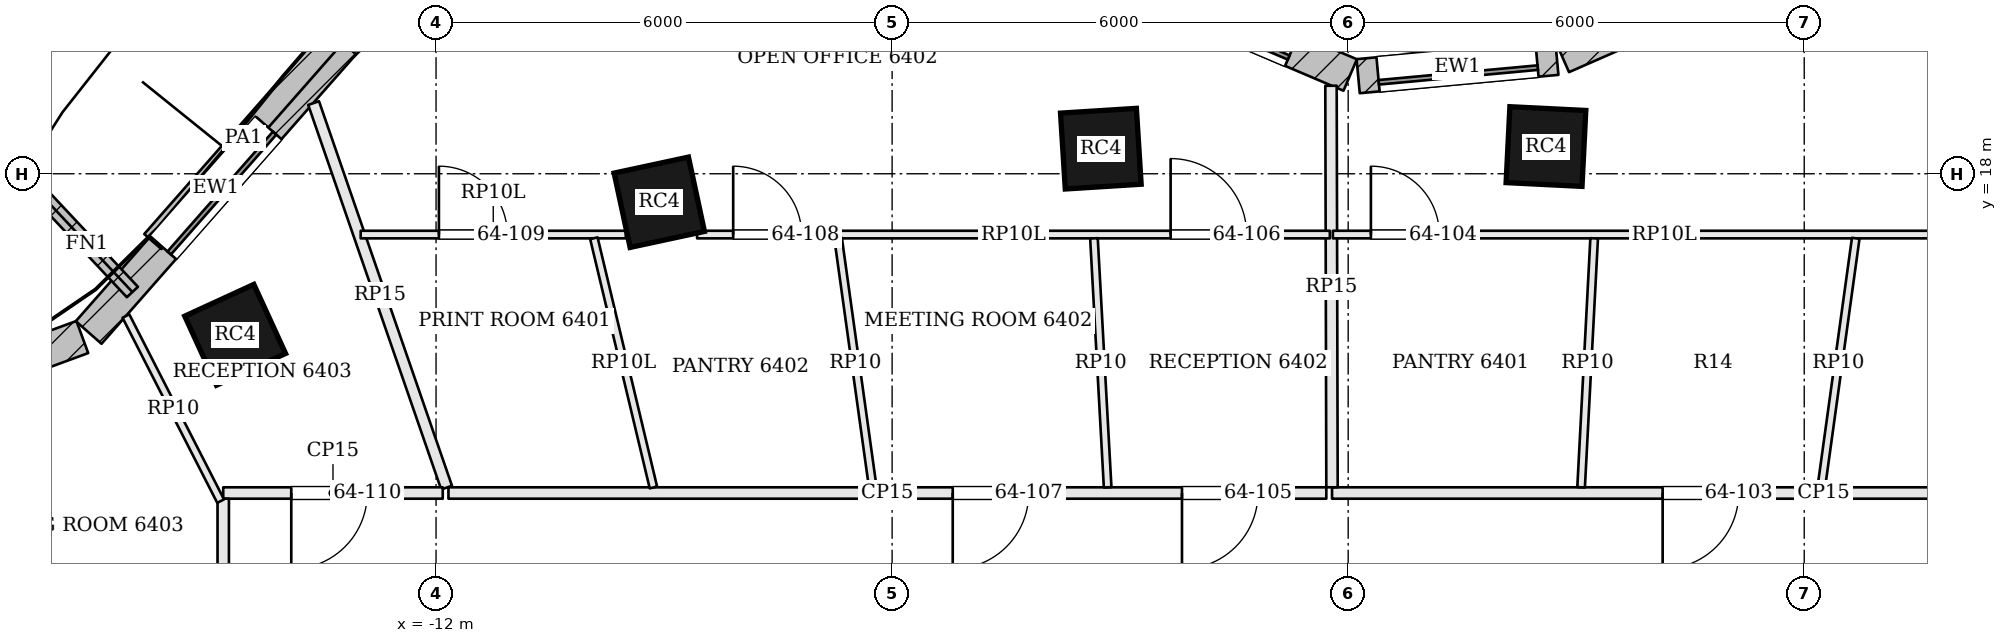
"""IFC4 building model, lengths in metres.
Left out: names, types, materials, properties, quantities, classifications, styles, units other than length and angle.
Written with IfcOpenShell. Run it as: python <this file> out.ifc"""

import sys

from ifc_helpers import new_model, si_unit, direction, frame, frame_2d, origin, origin_2d, place, context, subcontext, project, spatial, rectangle, extrude, element, fill, save


model = new_model("IFC4")
c1 = context("Model", 3, precision=1e-05, world=origin(), true_north=direction((0.0, 1.0)))
c2 = subcontext(c1, "Body", "Model", "MODEL_VIEW")
j1 = project(units=[si_unit("LENGTHUNIT", "METRE"), si_unit("PLANEANGLEUNIT", "RADIAN")], contexts=[c1])
p1 = place(None, origin())
s1 = spatial("IfcSite", under=j1, at=p1, CompositionType="ELEMENT")
p2 = place(p1, origin())
s2 = spatial("IfcBuilding", under=s1, at=p2, CompositionType="ELEMENT")
p3 = place(p2, frame((0.0, 0.0, 260.4)))
s3 = spatial("IfcBuildingStorey", under=s2, at=p3, CompositionType="ELEMENT", Elevation=260.4)
for number, where, z_axis, x_axis in (
    (1, (2.602, 18.358, 0.0), (0.0, 0.0, 1.0), (-0.999, 0.05, 0.0)),
    (2, (-3.254, 18.33, 0.0), (0.0, 0.0, 1.0), (-0.998, -0.063, 0.0)),
    (3, (-9.063, 17.625, 0.0), (0.0, 0.0, 1.0), (-0.978, -0.21, 0.0)),
    (4, (-14.643, 15.881, 0.0), (0.0, 0.0, 1.0), (-0.909, -0.417, 0.0)),
):
    element("IfcColumn", number, at=place(p3, frame(where, z_axis=z_axis, x_axis=x_axis)), inside=s3, PredefinedType="COLUMN", context=c2, shape_type="SweptSolid", body=[
        extrude(rectangle(XDim=1.0, YDim=1.0, at=origin_2d()), origin(), (0.0, 0.0, 1.0), 3.1),
    ])
p4 = place(p3, frame((7.276, 21.498, 0.0), z_axis=(0.0, 0.0, 1.0), x_axis=(-0.915872941312, -0.401468249519, 0.0)))
e5 = element("IfcWall", 5, at=p4, inside=s3, PredefinedType="SOLIDWALL", context=c2, shape_type="SweptSolid", body=[
    extrude(rectangle(XDim=4.87, YDim=0.45, at=frame_2d((2.435, 0.0))), origin(), (0.0, 0.0, 1.0), 3.6),
])
p5 = place(p4, frame((1.385, 0.0, 0.9)))
e6 = element("IfcOpeningElement", 6, at=p5, cuts=e5, PredefinedType="OPENING", context=c2, shape_type="SweptSolid", body=[
    extrude(rectangle(XDim=2.1, YDim=1.8, at=frame_2d((1.05, 0.9))), frame((0.0, 0.235, 0.0), z_axis=(0.0, -1.0, 0.0), x_axis=(1.0, 0.0, 0.0)), (0.0, 0.0, 1.0), 0.47),
])
p6 = place(p3, frame((2.745, 19.525, 0.0), z_axis=(0.0, 0.0, 1.0), x_axis=(-0.995768774275, -0.091894222771, 0.0)))
e7 = element("IfcWall", 7, at=p6, inside=s3, PredefinedType="SOLIDWALL", context=c2, shape_type="SweptSolid", body=[
    extrude(rectangle(XDim=2.625, YDim=0.45, at=frame_2d((1.312, 0.0))), origin(), (0.0, 0.0, 1.0), 3.6),
])
p7 = place(p6, frame((0.262, 0.0, 0.9)))
e8 = element("IfcOpeningElement", 8, at=p7, cuts=e7, PredefinedType="OPENING", context=c2, shape_type="SweptSolid", body=[
    extrude(rectangle(XDim=2.1, YDim=1.8, at=frame_2d((1.05, 0.9))), frame((0.0, 0.235, 0.0), z_axis=(0.0, -1.0, 0.0), x_axis=(1.0, 0.0, 0.0)), (0.0, 0.0, 1.0), 0.47),
])
p8 = place(p3, frame((0.026, 19.299, 0.0), z_axis=(0.0, 0.0, 1.0), x_axis=(-0.920040408927, 0.391823488245, 0.0)))
e9 = element("IfcWall", 9, at=p8, inside=s3, PredefinedType="SOLIDWALL", context=c2, shape_type="SweptSolid", body=[
    extrude(rectangle(XDim=3.77, YDim=0.45, at=frame_2d((1.885, 0.0))), origin(), (0.0, 0.0, 1.0), 3.6),
])
p9 = place(p8, frame((0.835, 0.0, 0.9)))
e10 = element("IfcOpeningElement", 10, at=p9, cuts=e9, PredefinedType="OPENING", context=c2, shape_type="SweptSolid", body=[
    extrude(rectangle(XDim=2.1, YDim=1.8, at=frame_2d((1.05, 0.9))), frame((0.0, 0.235, 0.0), z_axis=(0.0, -1.0, 0.0), x_axis=(1.0, 0.0, 0.0)), (0.0, 0.0, 1.0), 0.47),
])
p10 = place(p3, frame((-11.027, 21.779, 0.0), z_axis=(0.0, 0.0, 1.0), x_axis=(-0.728871214251, -0.684650825631, 0.0)))
e11 = element("IfcWall", 11, at=p10, inside=s3, PredefinedType="SOLIDWALL", context=c2, shape_type="SweptSolid", body=[
    extrude(rectangle(XDim=3.031, YDim=0.45, at=frame_2d((1.516, 0.0))), origin(), (0.0, 0.0, 1.0), 3.6),
])
p11 = place(p10, frame((0.466, 0.0, 0.9)))
e12 = element("IfcOpeningElement", 12, at=p11, cuts=e11, PredefinedType="OPENING", context=c2, shape_type="SweptSolid", body=[
    extrude(rectangle(XDim=2.1, YDim=1.8, at=frame_2d((1.05, 0.9))), frame((0.0, 0.235, 0.0), z_axis=(0.0, -1.0, 0.0), x_axis=(1.0, 0.0, 0.0)), (0.0, 0.0, 1.0), 0.47),
])
p12 = place(p3, frame((-13.221, 19.719, 0.0), z_axis=(0.0, 0.0, 1.0), x_axis=(-0.660424908916, -0.750892095899, 0.0)))
e13 = element("IfcWall", 13, at=p12, inside=s3, PredefinedType="SOLIDWALL", context=c2, shape_type="SweptSolid", body=[
    extrude(rectangle(XDim=5.071, YDim=0.45, at=frame_2d((2.535, 0.0))), origin(), (0.0, 0.0, 1.0), 3.6),
])
p13 = place(p12, frame((1.485, 0.0, 0.9)))
e14 = element("IfcOpeningElement", 14, at=p13, cuts=e13, PredefinedType="OPENING", context=c2, shape_type="SweptSolid", body=[
    extrude(rectangle(XDim=2.1, YDim=1.8, at=frame_2d((1.05, 0.9))), frame((0.0, 0.235, 0.0), z_axis=(0.0, -1.0, 0.0), x_axis=(1.0, 0.0, 0.0)), (0.0, 0.0, 1.0), 0.47),
])
p14 = place(p3, frame((-16.654, 15.852, 0.0), z_axis=(0.0, 0.0, 1.0), x_axis=(-0.938636568132, -0.344907803572, 0.0)))
e15 = element("IfcWall", 15, at=p14, inside=s3, PredefinedType="SOLIDWALL", context=c2, shape_type="SweptSolid", body=[
    extrude(rectangle(XDim=3.887, YDim=0.45, at=frame_2d((1.944, 0.0))), origin(), (0.0, 0.0, 1.0), 3.6),
])
p15 = place(p14, frame((0.894, 0.0, 0.9)))
e16 = element("IfcOpeningElement", 16, at=p15, cuts=e15, PredefinedType="OPENING", context=c2, shape_type="SweptSolid", body=[
    extrude(rectangle(XDim=2.1, YDim=1.8, at=frame_2d((1.05, 0.9))), frame((0.0, 0.235, 0.0), z_axis=(0.0, -1.0, 0.0), x_axis=(1.0, 0.0, 0.0)), (0.0, 0.0, 1.0), 0.47),
])
p16 = place(p3, frame((-15.995, 16.444, 0.0), z_axis=(0.0, 0.0, 1.0), x_axis=(-0.683852936488, 0.729619874494, 0.0)))
e17 = element("IfcWall", 17, at=p16, inside=s3, PredefinedType="SOLIDWALL", context=c2, shape_type="SweptSolid", body=[
    extrude(rectangle(XDim=1.75, YDim=0.2, at=frame_2d((0.875, 0.0))), origin(), (0.0, 0.0, 1.0), 3.6),
])
p17 = place(p3, frame((-13.339, 19.822, 3.9), z_axis=(0.0, 0.0, 1.0), x_axis=(-0.660443655688, -0.750875607316, 0.0)))
e18 = element("IfcWall", 18, at=p17, inside=s3, PredefinedType="PARAPET", context=c2, shape_type="SweptSolid", body=[
    extrude(rectangle(XDim=3.615, YDim=0.3, at=frame_2d((1.808, 0.0))), origin(), (0.0, 0.0, 1.0), 1.1),
])
p18 = place(p3, frame((12.119, 13.8, 0.0), z_axis=(0.0, 0.0, 1.0), x_axis=(-1.0, 0.0, 0.0)))
e19 = element("IfcWall", 19, at=p18, inside=s3, PredefinedType="PARTITIONING", context=c2, shape_type="SweptSolid", body=[
    extrude(rectangle(XDim=12.332, YDim=0.15, at=frame_2d((6.166, 0.0))), origin(), (0.0, 0.0, 1.0), 2.984),
])
p19 = place(p18, frame((2.053, 0.0, 0.0)))
e20 = element("IfcOpeningElement", 20, at=p19, cuts=e19, PredefinedType="OPENING", context=c2, shape_type="SweptSolid", body=[
    extrude(rectangle(XDim=1.8, YDim=2.1, at=frame_2d((0.9, 1.05))), frame((0.0, 0.085, 0.0), z_axis=(0.0, -1.0, 0.0), x_axis=(1.0, 0.0, 0.0)), (0.0, 0.0, 1.0), 0.17),
])
p20 = place(p18, frame((6.982, 0.0, 0.0)))
e21 = element("IfcOpeningElement", 21, at=p20, cuts=e19, PredefinedType="OPENING", context=c2, shape_type="SweptSolid", body=[
    extrude(rectangle(XDim=1.0, YDim=2.4, at=frame_2d((0.5, 1.2))), frame((0.0, 0.085, 0.0), z_axis=(0.0, -1.0, 0.0), x_axis=(1.0, 0.0, 0.0)), (0.0, 0.0, 1.0), 0.17),
])
p21 = place(p3, frame((-0.226, 19.158, 0.0), z_axis=(0.0, 0.0, 1.0), x_axis=(0.002541816357, -0.99999676958, 0.0)))
e22 = element("IfcWall", 22, at=p21, inside=s3, PredefinedType="PARTITIONING", context=c2, shape_type="SweptSolid", body=[
    extrude(rectangle(XDim=5.283, YDim=0.15, at=frame_2d((2.641, 0.0))), origin(), (0.0, 0.0, 1.0), 2.984),
])
p22 = place(p3, frame((-0.288, 13.8, 0.0), z_axis=(0.0, 0.0, 1.0), x_axis=(-1.0, 0.0, 0.0)))
e23 = element("IfcWall", 23, at=p22, inside=s3, PredefinedType="PARTITIONING", context=c2, shape_type="SweptSolid", body=[
    extrude(rectangle(XDim=11.549, YDim=0.15, at=frame_2d((5.775, 0.0))), origin(), (0.0, 0.0, 1.0), 2.984),
])
p23 = place(p22, frame((0.899, 0.0, 0.0)))
e24 = element("IfcOpeningElement", 24, at=p23, cuts=e23, PredefinedType="OPENING", context=c2, shape_type="SweptSolid", body=[
    extrude(rectangle(XDim=1.0, YDim=2.1, at=frame_2d((0.5, 1.05))), frame((0.0, 0.085, 0.0), z_axis=(0.0, -1.0, 0.0), x_axis=(1.0, 0.0, 0.0)), (0.0, 0.0, 1.0), 0.17),
])
p24 = place(p22, frame((3.915, 0.0, 0.0)))
e25 = element("IfcOpeningElement", 25, at=p24, cuts=e23, PredefinedType="OPENING", context=c2, shape_type="SweptSolid", body=[
    extrude(rectangle(XDim=1.0, YDim=2.4, at=frame_2d((0.5, 1.2))), frame((0.0, 0.085, 0.0), z_axis=(0.0, -1.0, 0.0), x_axis=(1.0, 0.0, 0.0)), (0.0, 0.0, 1.0), 0.17),
])
p25 = place(p3, frame((-13.611, 18.93, 0.0), z_axis=(0.0, 0.0, 1.0), x_axis=(0.326825455095, -0.945084716786, 0.0)))
e26 = element("IfcWall", 26, at=p25, inside=s3, PredefinedType="PARTITIONING", context=c2, shape_type="SweptSolid", body=[
    extrude(rectangle(XDim=5.353, YDim=0.15, at=frame_2d((2.677, 0.0))), origin(), (0.0, 0.0, 1.0), 2.984),
])
p26 = place(p3, frame((-11.912, 13.8, 0.0), z_axis=(0.0, 0.0, 1.0), x_axis=(-1.0, 0.0, 0.0)))
e27 = element("IfcWall", 27, at=p26, inside=s3, PredefinedType="PARTITIONING", context=c2, shape_type="SweptSolid", body=[
    extrude(rectangle(XDim=2.888, YDim=0.15, at=frame_2d((1.444, 0.0))), origin(), (0.0, 0.0, 1.0), 2.984),
])
p27 = place(p26, frame((0.993, 0.0, 0.0)))
e28 = element("IfcOpeningElement", 28, at=p27, cuts=e27, PredefinedType="OPENING", context=c2, shape_type="SweptSolid", body=[
    extrude(rectangle(XDim=1.0, YDim=2.1, at=frame_2d((0.5, 1.05))), frame((0.0, 0.085, 0.0), z_axis=(0.0, -1.0, 0.0), x_axis=(1.0, 0.0, 0.0)), (0.0, 0.0, 1.0), 0.17),
])
p28 = place(p3, frame((-14.8, 13.725, 0.0), z_axis=(0.0, 0.0, 1.0), x_axis=(0.0, -1.0, 0.0)))
e29 = element("IfcWall", 29, at=p28, inside=s3, PredefinedType="PARTITIONING", context=c2, shape_type="SweptSolid", body=[
    extrude(rectangle(XDim=10.059, YDim=0.15, at=frame_2d((5.03, 0.0))), origin(), (0.0, 0.0, 1.0), 2.984),
])
p29 = place(p28, frame((2.596, 0.0, 0.0)))
e30 = element("IfcOpeningElement", 30, at=p29, cuts=e29, PredefinedType="OPENING", context=c2, shape_type="SweptSolid", body=[
    extrude(rectangle(XDim=1.0, YDim=2.4, at=frame_2d((0.5, 1.2))), frame((0.0, 0.085, 0.0), z_axis=(0.0, -1.0, 0.0), x_axis=(1.0, 0.0, 0.0)), (0.0, 0.0, 1.0), 0.17),
])
p30 = place(p28, frame((7.45, 0.0, 0.0)))
e31 = element("IfcOpeningElement", 31, at=p30, cuts=e29, PredefinedType="OPENING", context=c2, shape_type="SweptSolid", body=[
    extrude(rectangle(XDim=1.0, YDim=2.1, at=frame_2d((0.5, 1.05))), frame((0.0, 0.085, 0.0), z_axis=(0.0, -1.0, 0.0), x_axis=(1.0, 0.0, 0.0)), (0.0, 0.0, 1.0), 0.17),
])
p31 = place(p3, frame((-0.201, 17.2, 0.0), z_axis=(0.0, 0.0, 1.0), x_axis=(1.0, 0.0, 0.0)))
e32 = element("IfcWall", 32, at=p31, inside=s3, PredefinedType="PARTITIONING", context=c2, shape_type="SweptSolid", body=[
    extrude(rectangle(XDim=8.722, YDim=0.1, at=frame_2d((4.361, 0.0))), origin(), (0.0, 0.0, 1.0), 2.58),
])
p32 = place(p31, frame((0.5, 0.0, 0.0)))
e33 = element("IfcOpeningElement", 33, at=p32, cuts=e32, PredefinedType="OPENING", context=c2, shape_type="SweptSolid", body=[
    extrude(rectangle(XDim=0.9, YDim=2.1, at=frame_2d((0.45, 1.05))), frame((0.0, 0.06, 0.0), z_axis=(0.0, -1.0, 0.0), x_axis=(1.0, 0.0, 0.0)), (0.0, 0.0, 1.0), 0.12),
])
p33 = place(p3, frame((6.224, 13.874, 0.0), z_axis=(0.0, 0.0, 1.0), x_axis=(0.13700708293, 0.990570067803, 0.0)))
e34 = element("IfcWall", 34, at=p33, inside=s3, PredefinedType="PARTITIONING", context=c2, shape_type="SweptSolid", body=[
    extrude(rectangle(XDim=3.307, YDim=0.1, at=frame_2d((1.654, 0.0))), origin(), (0.0, 0.0, 1.0), 2.984),
])
p34 = place(p3, frame((3.064, 13.875, 0.0), z_axis=(0.0, 0.0, 1.0), x_axis=(0.05240645469, 0.998625837592, 0.0)))
e35 = element("IfcWall", 35, at=p34, inside=s3, PredefinedType="PARTITIONING", context=c2, shape_type="SweptSolid", body=[
    extrude(rectangle(XDim=3.28, YDim=0.1, at=frame_2d((1.64, 0.0))), origin(), (0.0, 0.0, 1.0), 2.984),
])
p35 = place(p3, frame((-12.991, 17.2, 0.0), z_axis=(0.0, 0.0, 1.0), x_axis=(1.0, 0.0, 0.0)))
e36 = element("IfcWall", 36, at=p35, inside=s3, PredefinedType="PARTITIONING", context=c2, shape_type="SweptSolid", body=[
    extrude(rectangle(XDim=3.488, YDim=0.1, at=frame_2d((1.744, 0.0))), origin(), (0.0, 0.0, 1.0), 2.58),
])
p36 = place(p35, frame((1.029, 0.0, 0.0)))
e37 = element("IfcOpeningElement", 37, at=p36, cuts=e36, PredefinedType="OPENING", context=c2, shape_type="SweptSolid", body=[
    extrude(rectangle(XDim=0.9, YDim=2.1, at=frame_2d((0.45, 1.05))), frame((0.0, 0.06, 0.0), z_axis=(0.0, -1.0, 0.0), x_axis=(1.0, 0.0, 0.0)), (0.0, 0.0, 1.0), 0.12),
])
p37 = place(p3, frame((-8.566, 17.2, 0.0), z_axis=(0.0, 0.0, 1.0), x_axis=(1.0, 0.0, 0.0)))
e38 = element("IfcWall", 38, at=p37, inside=s3, PredefinedType="PARTITIONING", context=c2, shape_type="SweptSolid", body=[
    extrude(rectangle(XDim=8.325, YDim=0.1, at=frame_2d((4.162, 0.0))), origin(), (0.0, 0.0, 1.0), 2.58),
])
p38 = place(p37, frame((6.23, 0.0, 0.0)))
e39 = element("IfcOpeningElement", 39, at=p38, cuts=e38, PredefinedType="OPENING", context=c2, shape_type="SweptSolid", body=[
    extrude(rectangle(XDim=1.0, YDim=2.1, at=frame_2d((0.5, 1.05))), frame((0.0, 0.06, 0.0), z_axis=(0.0, -1.0, 0.0), x_axis=(1.0, 0.0, 0.0)), (0.0, 0.0, 1.0), 0.12),
])
p39 = place(p37, frame((0.475, 0.0, 0.0)))
e40 = element("IfcOpeningElement", 40, at=p39, cuts=e38, PredefinedType="OPENING", context=c2, shape_type="SweptSolid", body=[
    extrude(rectangle(XDim=0.9, YDim=2.1, at=frame_2d((0.45, 1.05))), frame((0.0, 0.06, 0.0), z_axis=(0.0, -1.0, 0.0), x_axis=(1.0, 0.0, 0.0)), (0.0, 0.0, 1.0), 0.12),
])
p40 = place(p3, frame((-3.165, 13.875, 0.0), z_axis=(0.0, 0.0, 1.0), x_axis=(-0.054855780122, 0.998494288109, 0.0)))
e41 = element("IfcWall", 41, at=p40, inside=s3, PredefinedType="PARTITIONING", context=c2, shape_type="SweptSolid", body=[
    extrude(rectangle(XDim=3.28, YDim=0.1, at=frame_2d((1.64, 0.0))), origin(), (0.0, 0.0, 1.0), 2.984),
])
p41 = place(p3, frame((-6.254, 13.874, 0.0), z_axis=(0.0, 0.0, 1.0), x_axis=(-0.137948523614, 0.990439399879, 0.0)))
e42 = element("IfcWall", 42, at=p41, inside=s3, PredefinedType="PARTITIONING", context=c2, shape_type="SweptSolid", body=[
    extrude(rectangle(XDim=3.308, YDim=0.1, at=frame_2d((1.654, 0.0))), origin(), (0.0, 0.0, 1.0), 2.984),
])
p42 = place(p3, frame((-9.14, 13.873, 0.0), z_axis=(0.0, 0.0, 1.0), x_axis=(-0.232348315027, 0.97263264417, 0.0)))
e43 = element("IfcWall", 43, at=p42, inside=s3, PredefinedType="PARTITIONING", context=c2, shape_type="SweptSolid", body=[
    extrude(rectangle(XDim=3.371, YDim=0.1, at=frame_2d((1.686, 0.0))), origin(), (0.0, 0.0, 1.0), 2.58),
])
p43 = place(p3, frame((-14.834, 13.693, 0.0), z_axis=(0.0, 0.0, 1.0), x_axis=(-0.455511992018, 0.89022964741, 0.0)))
e44 = element("IfcWall", 44, at=p43, inside=s3, PredefinedType="PARTITIONING", context=c2, shape_type="SweptSolid", body=[
    extrude(rectangle(XDim=2.736, YDim=0.1, at=frame_2d((1.368, 0.0))), origin(), (0.0, 0.0, 1.0), 2.984),
])
p44 = place(p7, origin())
e45 = element("IfcWindow", 45, at=p44, inside=s3, PartitioningType="SINGLE_PANEL", PredefinedType="WINDOW", context=c2, shape_type="SweptSolid", body=[
    extrude(rectangle(XDim=2.1, YDim=1.8, at=frame_2d((1.05, 0.9))), frame((0.0, 0.135, 0.0), z_axis=(0.0, -1.0, 0.0), x_axis=(1.0, 0.0, 0.0)), (0.0, 0.0, 1.0), 0.06),
])
fill(e8, e45)
p45 = place(p9, origin())
e46 = element("IfcWindow", 46, at=p45, inside=s3, PartitioningType="SINGLE_PANEL", PredefinedType="WINDOW", context=c2, shape_type="SweptSolid", body=[
    extrude(rectangle(XDim=2.1, YDim=1.8, at=frame_2d((1.05, 0.9))), frame((0.0, 0.135, 0.0), z_axis=(0.0, -1.0, 0.0), x_axis=(1.0, 0.0, 0.0)), (0.0, 0.0, 1.0), 0.06),
])
fill(e10, e46)
p46 = place(p13, origin())
e47 = element("IfcWindow", 47, at=p46, inside=s3, PartitioningType="SINGLE_PANEL", PredefinedType="WINDOW", context=c2, shape_type="SweptSolid", body=[
    extrude(rectangle(XDim=2.1, YDim=1.8, at=frame_2d((1.05, 0.9))), frame((0.0, 0.135, 0.0), z_axis=(0.0, -1.0, 0.0), x_axis=(1.0, 0.0, 0.0)), (0.0, 0.0, 1.0), 0.06),
])
fill(e14, e47)
p47 = place(p20, origin())
e48 = element("IfcDoor", 48, at=p47, inside=s3, OperationType="SINGLE_SWING_RIGHT", PredefinedType="DOOR", context=c2, shape_type="SweptSolid", body=[
    extrude(rectangle(XDim=1.0, YDim=2.4, at=frame_2d((0.5, 1.2))), frame((0.0, 0.025, 0.0), z_axis=(0.0, -1.0, 0.0), x_axis=(1.0, 0.0, 0.0)), (0.0, 0.0, 1.0), 0.05),
])
fill(e21, e48)
p48 = place(p32, origin())
e49 = element("IfcDoor", 49, at=p48, inside=s3, OperationType="SINGLE_SWING_LEFT", PredefinedType="DOOR", context=c2, shape_type="SweptSolid", body=[
    extrude(rectangle(XDim=0.9, YDim=2.1, at=frame_2d((0.45, 1.05))), frame((0.0, 0.025, 0.0), z_axis=(0.0, -1.0, 0.0), x_axis=(1.0, 0.0, 0.0)), (0.0, 0.0, 1.0), 0.05),
])
fill(e33, e49)
p49 = place(p23, origin())
e50 = element("IfcDoor", 50, at=p49, inside=s3, OperationType="SINGLE_SWING_RIGHT", PredefinedType="DOOR", context=c2, shape_type="SweptSolid", body=[
    extrude(rectangle(XDim=1.0, YDim=2.1, at=frame_2d((0.5, 1.05))), frame((0.0, 0.025, 0.0), z_axis=(0.0, -1.0, 0.0), x_axis=(1.0, 0.0, 0.0)), (0.0, 0.0, 1.0), 0.05),
])
fill(e24, e50)
p50 = place(p38, origin())
e51 = element("IfcDoor", 51, at=p50, inside=s3, OperationType="SINGLE_SWING_LEFT", PredefinedType="DOOR", context=c2, shape_type="SweptSolid", body=[
    extrude(rectangle(XDim=1.0, YDim=2.1, at=frame_2d((0.5, 1.05))), frame((0.0, 0.025, 0.0), z_axis=(0.0, -1.0, 0.0), x_axis=(1.0, 0.0, 0.0)), (0.0, 0.0, 1.0), 0.05),
])
fill(e39, e51)
p51 = place(p24, origin())
e52 = element("IfcDoor", 52, at=p51, inside=s3, OperationType="SINGLE_SWING_RIGHT", PredefinedType="DOOR", context=c2, shape_type="SweptSolid", body=[
    extrude(rectangle(XDim=1.0, YDim=2.4, at=frame_2d((0.5, 1.2))), frame((0.0, 0.025, 0.0), z_axis=(0.0, -1.0, 0.0), x_axis=(1.0, 0.0, 0.0)), (0.0, 0.0, 1.0), 0.05),
])
fill(e25, e52)
p52 = place(p39, origin())
e53 = element("IfcDoor", 53, at=p52, inside=s3, OperationType="SINGLE_SWING_LEFT", PredefinedType="DOOR", context=c2, shape_type="SweptSolid", body=[
    extrude(rectangle(XDim=0.9, YDim=2.1, at=frame_2d((0.45, 1.05))), frame((0.0, 0.025, 0.0), z_axis=(0.0, -1.0, 0.0), x_axis=(1.0, 0.0, 0.0)), (0.0, 0.0, 1.0), 0.05),
])
fill(e40, e53)
p53 = place(p36, origin())
e54 = element("IfcDoor", 54, at=p53, inside=s3, OperationType="SINGLE_SWING_LEFT", PredefinedType="DOOR", context=c2, shape_type="SweptSolid", body=[
    extrude(rectangle(XDim=0.9, YDim=2.1, at=frame_2d((0.45, 1.05))), frame((0.0, 0.025, 0.0), z_axis=(0.0, -1.0, 0.0), x_axis=(1.0, 0.0, 0.0)), (0.0, 0.0, 1.0), 0.05),
])
fill(e37, e54)
p54 = place(p27, origin())
e55 = element("IfcDoor", 55, at=p54, inside=s3, OperationType="SINGLE_SWING_RIGHT", PredefinedType="DOOR", context=c2, shape_type="SweptSolid", body=[
    extrude(rectangle(XDim=1.0, YDim=2.1, at=frame_2d((0.5, 1.05))), frame((0.0, 0.025, 0.0), z_axis=(0.0, -1.0, 0.0), x_axis=(1.0, 0.0, 0.0)), (0.0, 0.0, 1.0), 0.05),
])
fill(e28, e55)
save(model, sys.argv[1])
